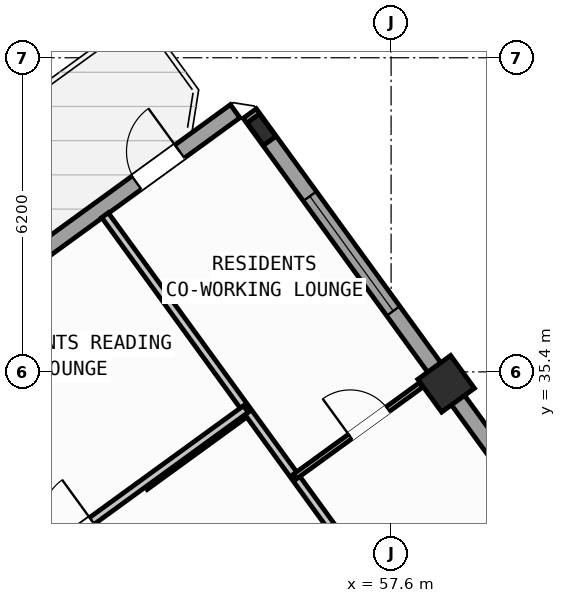
"""IFC4 building model, lengths in metres.
Left out: names, types, materials, properties, quantities, classifications, styles, units other than length and angle.
Written with IfcOpenShell. Run it as: python <this file> out.ifc"""

import sys

from ifc_helpers import new_model, si_unit, direction, frame, frame_2d, origin, origin_2d, place, context, subcontext, project, spatial, rectangle, hollow_rectangle, i_section, extrude, source, transform, mapped, element, fill, save


model = new_model("IFC4")
c1 = context("Model", 3, precision=1e-05, world=origin(), true_north=direction((0.0, 1.0)))
c2 = subcontext(c1, "Body", "Model", "MODEL_VIEW")
j1 = project(units=[si_unit("LENGTHUNIT", "METRE"), si_unit("PLANEANGLEUNIT", "RADIAN")], contexts=[c1])
p1 = place(None, origin())
s1 = spatial("IfcSite", under=j1, at=p1, CompositionType="ELEMENT")
p2 = place(p1, origin())
s2 = spatial("IfcBuilding", under=s1, at=p2, CompositionType="ELEMENT")
p3 = place(p2, frame((0.0, 0.0, 199.5)))
s3 = spatial("IfcBuildingStorey", under=s2, at=p3, CompositionType="ELEMENT", Elevation=199.5)
m1 = source(origin(), c2, "Body", "SweptSolid", [
    extrude(hollow_rectangle(XDim=0.8, YDim=0.8, WallThickness=0.032, at=origin_2d()), origin(), (0.0, 0.0, 1.0), 4.5),
])
p4 = place(p3, frame((58.686, 35.165, 0.0), z_axis=(0.0, 0.0, 1.0), x_axis=(0.809016994375, 0.587785252292, 0.0)))
e1 = element("IfcColumn", 1, at=p4, inside=s3, PredefinedType="COLUMN", context=c2, shape_type="MappedRepresentation", body=[
    mapped(m1, transform((0.0, 0.0, 0.0), scale=1.0)),
])
m2 = source(origin(), c2, "Body", "SweptSolid", [
    extrude(i_section(OverallWidth=0.3, OverallDepth=0.55, WebThickness=0.015, FlangeThickness=0.029, at=origin_2d()), origin(), (0.0, 0.0, 1.0), 4.5),
])
p5 = place(p3, frame((55.042, 40.181, 0.0), z_axis=(0.0, 0.0, 1.0), x_axis=(0.809016994375, 0.587785252292, 0.0)))
e2 = element("IfcColumn", 2, at=p5, inside=s3, PredefinedType="COLUMN", context=c2, shape_type="MappedRepresentation", body=[
    mapped(m2, transform((0.0, 0.0, 0.0), scale=1.0)),
])
p6 = place(p3, frame((42.207, 31.597, 0.0), z_axis=(0.0, 0.0, 1.0), x_axis=(0.809020333377, 0.587780656523, 0.0)))
e3 = element("IfcWall", 3, at=p6, inside=s3, PredefinedType="STANDARD", context=c2, shape_type="SweptSolid", body=[
    extrude(rectangle(XDim=15.223, YDim=0.32, at=frame_2d((7.611, 0.0))), origin(), (0.0, 0.0, 1.0), 4.25),
])
p7 = place(p6, frame((12.82, 0.0, 0.0)))
e4 = element("IfcOpeningElement", 4, at=p7, cuts=e3, PredefinedType="OPENING", context=c2, shape_type="SweptSolid", body=[
    extrude(rectangle(XDim=1.05, YDim=2.15, at=frame_2d((0.525, 1.075))), frame((0.0, 0.17, 0.0), z_axis=(0.0, -1.0, 0.0), x_axis=(1.0, 0.0, 0.0)), (0.0, 0.0, 1.0), 0.34),
])
p8 = place(p6, frame((1.018, 0.0, 0.85)))
e5 = element("IfcOpeningElement", 5, at=p8, cuts=e3, PredefinedType="OPENING", context=c2, shape_type="SweptSolid", body=[
    extrude(rectangle(XDim=1.5, YDim=1.5, at=frame_2d((0.75, 0.75))), frame((0.0, 0.17, 0.0), z_axis=(0.0, -1.0, 0.0), x_axis=(1.0, 0.0, 0.0)), (0.0, 0.0, 1.0), 0.34),
])
p9 = place(p6, frame((5.394, 0.0, 0.8)))
e6 = element("IfcOpeningElement", 6, at=p9, cuts=e3, PredefinedType="OPENING", context=c2, shape_type="SweptSolid", body=[
    extrude(rectangle(XDim=2.1, YDim=1.55, at=frame_2d((1.05, 0.775))), frame((0.0, 0.17, 0.0), z_axis=(0.0, -1.0, 0.0), x_axis=(1.0, 0.0, 0.0)), (0.0, 0.0, 1.0), 0.34),
])
p10 = place(p3, frame((54.81, 40.5, 0.0), z_axis=(0.0, 0.0, 1.0), x_axis=(0.587783625747, -0.809018176127, 0.0)))
e7 = element("IfcWall", 7, at=p10, inside=s3, PredefinedType="STANDARD", context=c2, shape_type="SweptSolid", body=[
    extrude(rectangle(XDim=21.587, YDim=0.32, at=frame_2d((10.794, 0.0))), origin(), (0.0, 0.0, 1.0), 3.725),
])
p11 = place(p10, frame((2.018, 0.0, 0.65)))
e8 = element("IfcOpeningElement", 8, at=p11, cuts=e7, PredefinedType="OPENING", context=c2, shape_type="SweptSolid", body=[
    extrude(rectangle(XDim=2.8, YDim=2.1, at=frame_2d((1.4, 1.05))), frame((0.0, 0.17, 0.0), z_axis=(0.0, -1.0, 0.0), x_axis=(1.0, 0.0, 0.0)), (0.0, 0.0, 1.0), 0.34),
])
p12 = place(p10, frame((9.194, 0.0, 0.8)))
e9 = element("IfcOpeningElement", 9, at=p12, cuts=e7, PredefinedType="OPENING", context=c2, shape_type="SweptSolid", body=[
    extrude(rectangle(XDim=2.1, YDim=1.55, at=frame_2d((1.05, 0.775))), frame((0.0, 0.17, 0.0), z_axis=(0.0, -1.0, 0.0), x_axis=(1.0, 0.0, 0.0)), (0.0, 0.0, 1.0), 0.34),
])
p13 = place(p3, frame((52.739, 33.143, 0.0), z_axis=(0.0, 0.0, 1.0), x_axis=(0.809000999347, 0.58780726693, 0.0)))
e10 = element("IfcWall", 10, at=p13, inside=s3, PredefinedType="PARTITIONING", context=c2, shape_type="SweptSolid", body=[
    extrude(rectangle(XDim=2.51, YDim=0.16, at=frame_2d((1.255, 0.0))), origin(), (0.0, 0.0, 1.0), 4.24),
])
p14 = place(p3, frame((61.564, 25.266, 0.0), z_axis=(0.0, 0.0, 1.0), x_axis=(-0.587784527444, 0.809017521007, 0.0)))
e11 = element("IfcWall", 11, at=p14, inside=s3, PredefinedType="PARTITIONING", context=c2, shape_type="SweptSolid", body=[
    extrude(rectangle(XDim=16.35, YDim=0.16, at=frame_2d((8.175, 0.0))), origin(), (0.0, 0.0, 1.0), 4.24),
])
p15 = place(p3, frame((55.703, 33.334, 0.0), z_axis=(0.0, 0.0, 1.0), x_axis=(0.809044670406, 0.587747157618, 0.0)))
e12 = element("IfcWall", 12, at=p15, inside=s3, PredefinedType="PARTITIONING", context=c2, shape_type="SweptSolid", body=[
    extrude(rectangle(XDim=3.078, YDim=0.11, at=frame_2d((1.539, 0.0))), origin(), (0.0, 0.0, 1.0), 3.725),
])
p16 = place(p15, frame((1.345, 0.0, 0.0)))
e13 = element("IfcOpeningElement", 13, at=p16, cuts=e12, PredefinedType="OPENING", context=c2, shape_type="SweptSolid", body=[
    extrude(rectangle(XDim=0.92, YDim=2.08, at=frame_2d((0.46, 1.04))), frame((0.0, 0.065, 0.0), z_axis=(0.0, -1.0, 0.0), x_axis=(1.0, 0.0, 0.0)), (0.0, 0.0, 1.0), 0.13),
])
p17 = place(p3, frame((42.866, 26.044, 0.0), z_axis=(0.0, 0.0, 1.0), x_axis=(0.809020254154, 0.587780765566, 0.0)))
e14 = element("IfcWall", 14, at=p17, inside=s3, PredefinedType="PARTITIONING", context=c2, shape_type="SweptSolid", body=[
    extrude(rectangle(XDim=14.67, YDim=0.16, at=frame_2d((7.335, 0.0))), origin(), (0.0, 0.0, 1.0), 4.24),
])
p18 = place(p17, frame((3.215, 0.0, 0.0)))
e15 = element("IfcOpeningElement", 15, at=p18, cuts=e14, PredefinedType="OPENING", context=c2, shape_type="SweptSolid", body=[
    extrude(rectangle(XDim=1.0, YDim=2.1, at=frame_2d((0.5, 1.05))), frame((0.0, 0.09, 0.0), z_axis=(0.0, -1.0, 0.0), x_axis=(1.0, 0.0, 0.0)), (0.0, 0.0, 1.0), 0.18),
])
p19 = place(p17, frame((9.915, 0.0, 0.0)))
e16 = element("IfcOpeningElement", 16, at=p19, cuts=e14, PredefinedType="OPENING", context=c2, shape_type="SweptSolid", body=[
    extrude(rectangle(XDim=1.0, YDim=2.1, at=frame_2d((0.5, 1.05))), frame((0.0, 0.09, 0.0), z_axis=(0.0, -1.0, 0.0), x_axis=(1.0, 0.0, 0.0)), (0.0, 0.0, 1.0), 0.18),
])
m3 = source(origin(), c2, "Body", "SweptSolid", [
    extrude(rectangle(XDim=1.05, YDim=2.15, at=frame_2d((0.525, 1.075))), frame((0.0, 0.025, 0.0), z_axis=(0.0, -1.0, 0.0), x_axis=(1.0, 0.0, 0.0)), (0.0, 0.0, 1.0), 0.05),
])
p20 = place(p7, origin())
e17 = element("IfcDoor", 17, at=p20, inside=s3, OperationType="SINGLE_SWING_RIGHT", PredefinedType="DOOR", context=c2, shape_type="MappedRepresentation", body=[
    mapped(m3, transform((0.0, 0.0, 0.0), scale=1.0)),
])
fill(e4, e17)
m4 = source(origin(), c2, "Body", "SweptSolid", [
    extrude(rectangle(XDim=2.8, YDim=2.1, at=frame_2d((1.4, 1.05))), frame((0.0, 0.03, 0.0), z_axis=(0.0, -1.0, 0.0), x_axis=(1.0, 0.0, 0.0)), (0.0, 0.0, 1.0), 0.06),
])
p21 = place(p11, origin())
e18 = element("IfcWindow", 18, at=p21, inside=s3, PartitioningType="SINGLE_PANEL", PredefinedType="WINDOW", context=c2, shape_type="MappedRepresentation", body=[
    mapped(m4, transform((0.0, 0.0, 0.0), scale=1.0)),
])
fill(e8, e18)
m5 = source(origin(), c2, "Body", "SweptSolid", [
    extrude(rectangle(XDim=0.92, YDim=2.08, at=frame_2d((0.46, 1.04))), frame((0.0, 0.025, 0.0), z_axis=(0.0, -1.0, 0.0), x_axis=(1.0, 0.0, 0.0)), (0.0, 0.0, 1.0), 0.05),
])
p22 = place(p16, origin())
e19 = element("IfcDoor", 19, at=p22, inside=s3, OperationType="SINGLE_SWING_LEFT", PredefinedType="DOOR", context=c2, shape_type="MappedRepresentation", body=[
    mapped(m5, transform((0.0, 0.0, 0.0), scale=1.0)),
])
fill(e13, e19)
m6 = source(origin(), c2, "Body", "SweptSolid", [
    extrude(rectangle(XDim=1.0, YDim=2.1, at=frame_2d((0.5, 1.05))), frame((0.0, 0.025, 0.0), z_axis=(0.0, -1.0, 0.0), x_axis=(1.0, 0.0, 0.0)), (0.0, 0.0, 1.0), 0.05),
])
p23 = place(p19, origin())
e20 = element("IfcDoor", 20, at=p23, inside=s3, OperationType="SINGLE_SWING_RIGHT", PredefinedType="DOOR", context=c2, shape_type="MappedRepresentation", body=[
    mapped(m6, transform((0.0, 0.0, 0.0), scale=1.0)),
])
fill(e16, e20)
save(model, sys.argv[1])
